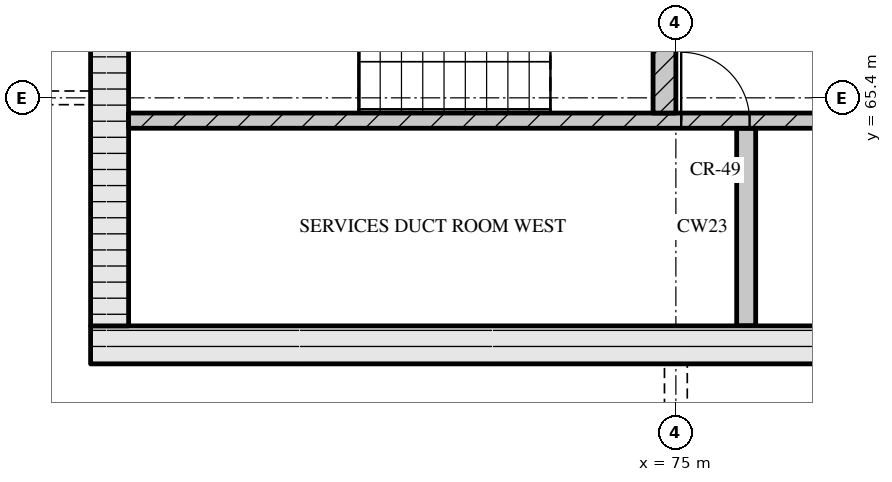
"""IFC4 building model, lengths in metres.
Left out: names, types, materials, properties, quantities, classifications, styles, units other than length and angle.
Written with IfcOpenShell. Run it as: python <this file> out.ifc"""

import sys

from ifc_helpers import new_model, si_unit, direction, frame, frame_2d, origin, place, context, subcontext, project, spatial, rectangle, extrude, element, fill, save


model = new_model("IFC4")
c1 = context("Model", 3, precision=1e-05, world=origin(), true_north=direction((0.0, 1.0)))
c2 = subcontext(c1, "Body", "Model", "MODEL_VIEW")
j1 = project(units=[si_unit("LENGTHUNIT", "METRE"), si_unit("PLANEANGLEUNIT", "RADIAN")], contexts=[c1])
p1 = place(None, origin())
s1 = spatial("IfcSite", under=j1, at=p1, CompositionType="ELEMENT")
p2 = place(p1, origin())
s2 = spatial("IfcBuilding", under=s1, at=p2, CompositionType="ELEMENT")
p3 = place(p2, frame((0.0, 0.0, 285.15)))
s3 = spatial("IfcBuildingStorey", under=s2, at=p3, CompositionType="ELEMENT", Elevation=285.15)
p4 = place(p3, frame((67.3, 62.15, 0.0), z_axis=(0.0, 0.0, 1.0), x_axis=(1.0, 0.0, 0.0)))
e1 = element("IfcWall", 1, at=p4, inside=s3, PredefinedType="SOLIDWALL", context=c2, shape_type="SweptSolid", body=[
    extrude(rectangle(XDim=40.6, YDim=0.5, at=frame_2d((20.3, 0.0))), origin(), (0.0, 0.0, 1.0), 3.32),
])
p5 = place(p4, frame((20.65, 0.0, 0.0)))
e2 = element("IfcOpeningElement", 2, at=p5, cuts=e1, PredefinedType="OPENING", context=c2, shape_type="SweptSolid", body=[
    extrude(rectangle(XDim=1.8, YDim=2.1, at=frame_2d((0.9, 1.05))), frame((0.0, 0.26, 0.0), z_axis=(0.0, -1.0, 0.0), x_axis=(1.0, 0.0, 0.0)), (0.0, 0.0, 1.0), 0.52),
])
p6 = place(p3, frame((67.55, 62.4, 0.0), z_axis=(0.0, 0.0, 1.0), x_axis=(0.0, 1.0, 0.0)))
e3 = element("IfcWall", 3, at=p6, inside=s3, PredefinedType="SOLIDWALL", context=c2, shape_type="SweptSolid", body=[
    extrude(rectangle(XDim=12.0, YDim=0.5, at=frame_2d((6.0, 0.0))), origin(), (0.0, 0.0, 1.0), 3.32),
])
p7 = place(p6, frame((6.45, 0.0, 0.0)))
e4 = element("IfcOpeningElement", 4, at=p7, cuts=e3, PredefinedType="OPENING", context=c2, shape_type="SweptSolid", body=[
    extrude(rectangle(XDim=1.2, YDim=2.1, at=frame_2d((0.6, 1.05))), frame((0.0, 0.26, 0.0), z_axis=(0.0, -1.0, 0.0), x_axis=(1.0, 0.0, 0.0)), (0.0, 0.0, 1.0), 0.52),
])
p8 = place(p3, frame((75.925, 62.4, 0.0), z_axis=(0.0, 0.0, 1.0), x_axis=(0.0, 1.0, 0.0)))
e5 = element("IfcWall", 5, at=p8, inside=s3, PredefinedType="SOLIDWALL", context=c2, shape_type="SweptSolid", body=[
    extrude(rectangle(XDim=2.6, YDim=0.25, at=frame_2d((1.3, 0.0))), origin(), (0.0, 0.0, 1.0), 3.32),
])
p9 = place(p3, frame((67.8, 65.1, 0.0), z_axis=(0.0, 0.0, 1.0), x_axis=(1.0, 0.0, 0.0)))
e6 = element("IfcWall", 6, at=p9, inside=s3, PredefinedType="SOLIDWALL", context=c2, shape_type="SweptSolid", body=[
    extrude(rectangle(XDim=18.5, YDim=0.2, at=frame_2d((9.25, 0.0))), origin(), (0.0, 0.0, 1.0), 3.32),
])
p10 = place(p9, frame((7.27, 0.0, 0.0)))
e7 = element("IfcOpeningElement", 7, at=p10, cuts=e6, PredefinedType="OPENING", context=c2, shape_type="SweptSolid", body=[
    extrude(rectangle(XDim=0.9, YDim=2.1, at=frame_2d((0.45, 1.05))), frame((0.0, 0.11, 0.0), z_axis=(0.0, -1.0, 0.0), x_axis=(1.0, 0.0, 0.0)), (0.0, 0.0, 1.0), 0.22),
])
p11 = place(p9, frame((9.65, 0.0, 0.0)))
e8 = element("IfcOpeningElement", 8, at=p11, cuts=e6, PredefinedType="OPENING", context=c2, shape_type="SweptSolid", body=[
    extrude(rectangle(XDim=0.9, YDim=2.1, at=frame_2d((0.45, 1.05))), frame((0.0, 0.11, 0.0), z_axis=(0.0, -1.0, 0.0), x_axis=(1.0, 0.0, 0.0)), (0.0, 0.0, 1.0), 0.22),
])
p12 = place(p9, frame((13.36, 0.0, 0.0)))
e9 = element("IfcOpeningElement", 9, at=p12, cuts=e6, PredefinedType="OPENING", context=c2, shape_type="SweptSolid", body=[
    extrude(rectangle(XDim=0.9, YDim=2.1, at=frame_2d((0.45, 1.05))), frame((0.0, 0.11, 0.0), z_axis=(0.0, -1.0, 0.0), x_axis=(1.0, 0.0, 0.0)), (0.0, 0.0, 1.0), 0.22),
])
p13 = place(p9, frame((16.7, 0.0, 0.0)))
e10 = element("IfcOpeningElement", 10, at=p13, cuts=e6, PredefinedType="OPENING", context=c2, shape_type="SweptSolid", body=[
    extrude(rectangle(XDim=0.9, YDim=2.1, at=frame_2d((0.45, 1.05))), frame((0.0, 0.11, 0.0), z_axis=(0.0, -1.0, 0.0), x_axis=(1.0, 0.0, 0.0)), (0.0, 0.0, 1.0), 0.22),
])
p14 = place(p3, frame((74.85, 65.2, 0.0), z_axis=(0.0, 0.0, 1.0), x_axis=(0.0, 1.0, 0.0)))
e11 = element("IfcWall", 11, at=p14, inside=s3, PredefinedType="SOLIDWALL", context=c2, shape_type="SweptSolid", body=[
    extrude(rectangle(XDim=2.85, YDim=0.3, at=frame_2d((1.425, 0.0))), origin(), (0.0, 0.0, 1.0), 3.32),
])
p15 = place(p10, origin())
e12 = element("IfcDoor", 12, at=p15, inside=s3, OperationType="SINGLE_SWING_LEFT", PredefinedType="DOOR", context=c2, shape_type="SweptSolid", body=[
    extrude(rectangle(XDim=0.9, YDim=2.1, at=frame_2d((0.45, 1.05))), frame((0.0, 0.025, 0.0), z_axis=(0.0, -1.0, 0.0), x_axis=(1.0, 0.0, 0.0)), (0.0, 0.0, 1.0), 0.05),
])
fill(e7, e12)
save(model, sys.argv[1])
